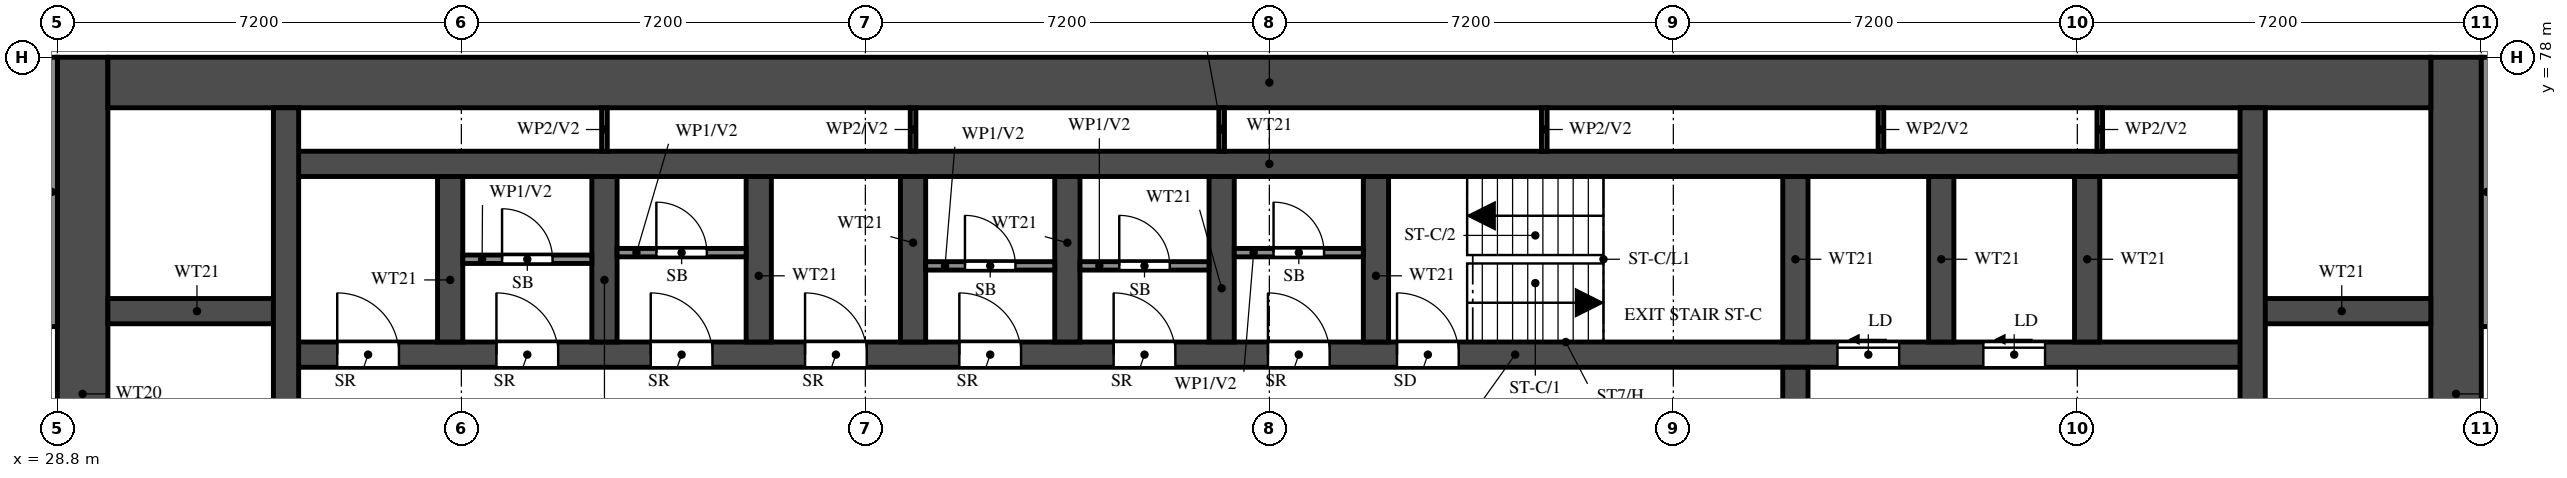
"""IFC4 building model, lengths in metres.
Left out: names, types, materials, properties, quantities, classifications, styles, units other than length and angle.
Written with IfcOpenShell. Run it as: python <this file> out.ifc"""

import sys

from ifc_helpers import new_model, si_unit, direction, frame, frame_2d, origin, place, context, subcontext, project, spatial, rectangle, extrude, element, fill, save


model = new_model("IFC4")
c1 = context("Model", 3, precision=1e-05, world=origin(), true_north=direction((0.0, 1.0)))
c2 = subcontext(c1, "Body", "Model", "MODEL_VIEW")
j1 = project(units=[si_unit("LENGTHUNIT", "METRE"), si_unit("PLANEANGLEUNIT", "RADIAN")], contexts=[c1])
p1 = place(None, origin())
s1 = spatial("IfcSite", under=j1, at=p1, CompositionType="ELEMENT")
p2 = place(p1, origin())
s2 = spatial("IfcBuilding", under=s1, at=p2, CompositionType="ELEMENT")
p3 = place(p2, frame((0.0, 0.0, 90.0)))
s3 = spatial("IfcBuildingStorey", under=s2, at=p3, CompositionType="ELEMENT", Elevation=90.0)
for number, where, z_axis, x_axis in (
    (1, (29.25, 66.0, 0.0), (0.0, 0.0, 1.0), (0.0, 1.0, 0.0)),
    (2, (71.55, 66.0, 0.0), (0.0, 0.0, 1.0), (0.0, 1.0, 0.0)),
):
    element("IfcWall", number, at=place(p3, frame(where, z_axis=z_axis, x_axis=x_axis)), inside=s3, PredefinedType="SHEAR", context=c2, shape_type="SweptSolid", body=[
        extrude(rectangle(XDim=12.0, YDim=0.9, at=frame_2d((6.0, 0.0))), origin(), (0.0, 0.0, 1.0), 3.18),
    ])
p4 = place(p3, frame((29.7, 77.55, 0.0), z_axis=(0.0, 0.0, 1.0), x_axis=(1.0, 0.0, 0.0)))
e3 = element("IfcWall", 3, at=p4, inside=s3, PredefinedType="SHEAR", context=c2, shape_type="SweptSolid", body=[
    extrude(rectangle(XDim=41.4, YDim=0.9, at=frame_2d((20.7, 0.0))), origin(), (0.0, 0.0, 1.0), 3.18),
])
p5 = place(p3, frame((32.875, 72.7, 0.0), z_axis=(0.0, 0.0, 1.0), x_axis=(1.0, 0.0, 0.0)))
e4 = element("IfcWall", 4, at=p5, inside=s3, PredefinedType="SHEAR", context=c2, shape_type="SweptSolid", body=[
    extrude(rectangle(XDim=35.05, YDim=0.45, at=frame_2d((17.525, 0.0))), origin(), (0.0, 0.0, 1.0), 3.18),
])
p6 = place(p5, frame((19.8, 0.0, 0.0)))
e5 = element("IfcOpeningElement", 5, at=p6, cuts=e4, PredefinedType="OPENING", context=c2, shape_type="SweptSolid", body=[
    extrude(rectangle(XDim=1.1, YDim=2.1, at=frame_2d((0.55, 1.05))), frame((0.0, 0.235, 0.0), z_axis=(0.0, -1.0, 0.0), x_axis=(1.0, 0.0, 0.0)), (0.0, 0.0, 1.0), 0.47),
])
p7 = place(p5, frame((27.65, 0.0, 0.0)))
e6 = element("IfcOpeningElement", 6, at=p7, cuts=e4, PredefinedType="OPENING", context=c2, shape_type="SweptSolid", body=[
    extrude(rectangle(XDim=1.1, YDim=2.1, at=frame_2d((0.55, 1.05))), frame((0.0, 0.235, 0.0), z_axis=(0.0, -1.0, 0.0), x_axis=(1.0, 0.0, 0.0)), (0.0, 0.0, 1.0), 0.47),
])
p8 = place(p5, frame((30.25, 0.0, 0.0)))
e7 = element("IfcOpeningElement", 7, at=p8, cuts=e4, PredefinedType="OPENING", context=c2, shape_type="SweptSolid", body=[
    extrude(rectangle(XDim=1.1, YDim=2.1, at=frame_2d((0.55, 1.05))), frame((0.0, 0.235, 0.0), z_axis=(0.0, -1.0, 0.0), x_axis=(1.0, 0.0, 0.0)), (0.0, 0.0, 1.0), 0.47),
])
p9 = place(p5, frame((3.75, 0.0, 0.0)))
e8 = element("IfcOpeningElement", 8, at=p9, cuts=e4, PredefinedType="OPENING", context=c2, shape_type="SweptSolid", body=[
    extrude(rectangle(XDim=1.1, YDim=2.1, at=frame_2d((0.55, 1.05))), frame((0.0, 0.235, 0.0), z_axis=(0.0, -1.0, 0.0), x_axis=(1.0, 0.0, 0.0)), (0.0, 0.0, 1.0), 0.47),
])
p10 = place(p5, frame((6.5, 0.0, 0.0)))
e9 = element("IfcOpeningElement", 9, at=p10, cuts=e4, PredefinedType="OPENING", context=c2, shape_type="SweptSolid", body=[
    extrude(rectangle(XDim=1.1, YDim=2.1, at=frame_2d((0.55, 1.05))), frame((0.0, 0.235, 0.0), z_axis=(0.0, -1.0, 0.0), x_axis=(1.0, 0.0, 0.0)), (0.0, 0.0, 1.0), 0.47),
])
p11 = place(p5, frame((9.25, 0.0, 0.0)))
e10 = element("IfcOpeningElement", 10, at=p11, cuts=e4, PredefinedType="OPENING", context=c2, shape_type="SweptSolid", body=[
    extrude(rectangle(XDim=1.1, YDim=2.1, at=frame_2d((0.55, 1.05))), frame((0.0, 0.235, 0.0), z_axis=(0.0, -1.0, 0.0), x_axis=(1.0, 0.0, 0.0)), (0.0, 0.0, 1.0), 0.47),
])
p12 = place(p5, frame((12.0, 0.0, 0.0)))
e11 = element("IfcOpeningElement", 11, at=p12, cuts=e4, PredefinedType="OPENING", context=c2, shape_type="SweptSolid", body=[
    extrude(rectangle(XDim=1.1, YDim=2.1, at=frame_2d((0.55, 1.05))), frame((0.0, 0.235, 0.0), z_axis=(0.0, -1.0, 0.0), x_axis=(1.0, 0.0, 0.0)), (0.0, 0.0, 1.0), 0.47),
])
p13 = place(p5, frame((14.75, 0.0, 0.0)))
e12 = element("IfcOpeningElement", 12, at=p13, cuts=e4, PredefinedType="OPENING", context=c2, shape_type="SweptSolid", body=[
    extrude(rectangle(XDim=1.1, YDim=2.1, at=frame_2d((0.55, 1.05))), frame((0.0, 0.235, 0.0), z_axis=(0.0, -1.0, 0.0), x_axis=(1.0, 0.0, 0.0)), (0.0, 0.0, 1.0), 0.47),
])
p14 = place(p5, frame((17.5, 0.0, 0.0)))
e13 = element("IfcOpeningElement", 13, at=p14, cuts=e4, PredefinedType="OPENING", context=c2, shape_type="SweptSolid", body=[
    extrude(rectangle(XDim=1.1, YDim=2.1, at=frame_2d((0.55, 1.05))), frame((0.0, 0.235, 0.0), z_axis=(0.0, -1.0, 0.0), x_axis=(1.0, 0.0, 0.0)), (0.0, 0.0, 1.0), 0.47),
])
p15 = place(p5, frame((0.913, 0.0, 0.0)))
e14 = element("IfcOpeningElement", 14, at=p15, cuts=e4, PredefinedType="OPENING", context=c2, shape_type="SweptSolid", body=[
    extrude(rectangle(XDim=1.1, YDim=2.1, at=frame_2d((0.55, 1.05))), frame((0.0, 0.235, 0.0), z_axis=(0.0, -1.0, 0.0), x_axis=(1.0, 0.0, 0.0)), (0.0, 0.0, 1.0), 0.47),
])
p16 = place(p3, frame((32.875, 76.1, 0.0), z_axis=(0.0, 0.0, 1.0), x_axis=(1.0, 0.0, 0.0)))
e15 = element("IfcWall", 15, at=p16, inside=s3, PredefinedType="SHEAR", context=c2, shape_type="SweptSolid", body=[
    extrude(rectangle(XDim=35.05, YDim=0.45, at=frame_2d((17.525, 0.0))), origin(), (0.0, 0.0, 1.0), 3.18),
])
for number, where, z_axis, x_axis in (
    (16, (29.7, 73.475, 0.0), (0.0, 0.0, 1.0), (1.0, 0.0, 0.0)),
    (17, (67.925, 73.475, 0.0), (0.0, 0.0, 1.0), (1.0, 0.0, 0.0)),
):
    element("IfcWall", number, at=place(p3, frame(where, z_axis=z_axis, x_axis=x_axis)), inside=s3, PredefinedType="SHEAR", context=c2, shape_type="SweptSolid", body=[
        extrude(rectangle(XDim=3.175, YDim=0.45, at=frame_2d((1.587, 0.0))), origin(), (0.0, 0.0, 1.0), 3.18),
    ])
p17 = place(p3, frame((32.875, 66.45, 0.0), z_axis=(0.0, 0.0, 1.0), x_axis=(0.0, 1.0, 0.0)))
e18 = element("IfcWall", 18, at=p17, inside=s3, PredefinedType="SHEAR", context=c2, shape_type="SweptSolid", body=[
    extrude(rectangle(XDim=10.65, YDim=0.45, at=frame_2d((5.325, 0.0))), origin(), (0.0, 0.0, 1.0), 3.18),
])
p18 = place(p3, frame((67.925, 66.45, 0.0), z_axis=(0.0, 0.0, 1.0), x_axis=(0.0, 1.0, 0.0)))
e19 = element("IfcWall", 19, at=p18, inside=s3, PredefinedType="SHEAR", context=c2, shape_type="SweptSolid", body=[
    extrude(rectangle(XDim=10.65, YDim=0.45, at=frame_2d((5.325, 0.0))), origin(), (0.0, 0.0, 1.0), 3.18),
])
p19 = place(p18, frame((0.15, 0.0, 0.0)))
e20 = element("IfcOpeningElement", 20, at=p19, cuts=e19, PredefinedType="OPENING", context=c2, shape_type="SweptSolid", body=[
    extrude(rectangle(XDim=1.1, YDim=2.1, at=frame_2d((0.55, 1.05))), frame((0.0, 0.235, 0.0), z_axis=(0.0, -1.0, 0.0), x_axis=(1.0, 0.0, 0.0)), (0.0, 0.0, 1.0), 0.47),
])
p20 = place(p3, frame((59.775, 66.45, 0.0), z_axis=(0.0, 0.0, 1.0), x_axis=(0.0, 1.0, 0.0)))
e21 = element("IfcWall", 21, at=p20, inside=s3, PredefinedType="SHEAR", context=c2, shape_type="SweptSolid", body=[
    extrude(rectangle(XDim=6.025, YDim=0.45, at=frame_2d((3.013, 0.0))), origin(), (0.0, 0.0, 1.0), 3.18),
])
p21 = place(p20, frame((3.85, 0.0, 0.0)))
e22 = element("IfcOpeningElement", 22, at=p21, cuts=e21, PredefinedType="OPENING", context=c2, shape_type="SweptSolid", body=[
    extrude(rectangle(XDim=1.2, YDim=2.1, at=frame_2d((0.6, 1.05))), frame((0.0, 0.235, 0.0), z_axis=(0.0, -1.0, 0.0), x_axis=(1.0, 0.0, 0.0)), (0.0, 0.0, 1.0), 0.47),
])
for number, where, z_axis, x_axis in (
    (23, (59.775, 72.925, 0.0), (0.0, 0.0, 1.0), (0.0, 1.0, 0.0)),
    (24, (35.8, 72.925, 0.0), (0.0, 0.0, 1.0), (0.0, 1.0, 0.0)),
    (25, (38.55, 72.925, 0.0), (0.0, 0.0, 1.0), (0.0, 1.0, 0.0)),
    (26, (41.3, 72.925, 0.0), (0.0, 0.0, 1.0), (0.0, 1.0, 0.0)),
    (27, (44.05, 72.925, 0.0), (0.0, 0.0, 1.0), (0.0, 1.0, 0.0)),
    (28, (46.8, 72.925, 0.0), (0.0, 0.0, 1.0), (0.0, 1.0, 0.0)),
    (29, (49.55, 72.925, 0.0), (0.0, 0.0, 1.0), (0.0, 1.0, 0.0)),
    (30, (52.3, 72.925, 0.0), (0.0, 0.0, 1.0), (0.0, 1.0, 0.0)),
    (31, (62.375, 72.925, 0.0), (0.0, 0.0, 1.0), (0.0, 1.0, 0.0)),
    (32, (64.975, 72.925, 0.0), (0.0, 0.0, 1.0), (0.0, 1.0, 0.0)),
):
    element("IfcWall", number, at=place(p3, frame(where, z_axis=z_axis, x_axis=x_axis)), inside=s3, PredefinedType="SHEAR", context=c2, shape_type="SweptSolid", body=[
        extrude(rectangle(XDim=2.95, YDim=0.45, at=frame_2d((1.475, 0.0))), origin(), (0.0, 0.0, 1.0), 3.18),
    ])
p22 = place(p3, frame((36.025, 74.4, 0.0), z_axis=(0.0, 0.0, 1.0), x_axis=(1.0, 0.0, 0.0)))
e33 = element("IfcWall", 33, at=p22, inside=s3, PredefinedType="PARTITIONING", context=c2, shape_type="SweptSolid", body=[
    extrude(rectangle(XDim=2.3, YDim=0.15, at=frame_2d((1.15, 0.0))), origin(), (0.0, 0.0, 1.0), 3.18),
])
p23 = place(p22, frame((0.7, 0.0, 0.0)))
e34 = element("IfcOpeningElement", 34, at=p23, cuts=e33, PredefinedType="OPENING", context=c2, shape_type="SweptSolid", body=[
    extrude(rectangle(XDim=0.9, YDim=2.1, at=frame_2d((0.45, 1.05))), frame((0.0, 0.085, 0.0), z_axis=(0.0, -1.0, 0.0), x_axis=(1.0, 0.0, 0.0)), (0.0, 0.0, 1.0), 0.17),
])
p24 = place(p3, frame((38.775, 74.518, 0.0), z_axis=(0.0, 0.0, 1.0), x_axis=(1.0, 0.0, 0.0)))
e35 = element("IfcWall", 35, at=p24, inside=s3, PredefinedType="PARTITIONING", context=c2, shape_type="SweptSolid", body=[
    extrude(rectangle(XDim=2.3, YDim=0.15, at=frame_2d((1.15, 0.0))), origin(), (0.0, 0.0, 1.0), 3.18),
])
p25 = place(p24, frame((0.7, 0.0, 0.0)))
e36 = element("IfcOpeningElement", 36, at=p25, cuts=e35, PredefinedType="OPENING", context=c2, shape_type="SweptSolid", body=[
    extrude(rectangle(XDim=0.9, YDim=2.1, at=frame_2d((0.45, 1.05))), frame((0.0, 0.085, 0.0), z_axis=(0.0, -1.0, 0.0), x_axis=(1.0, 0.0, 0.0)), (0.0, 0.0, 1.0), 0.17),
])
p26 = place(p3, frame((44.275, 74.282, 0.0), z_axis=(0.0, 0.0, 1.0), x_axis=(1.0, 0.0, 0.0)))
e37 = element("IfcWall", 37, at=p26, inside=s3, PredefinedType="PARTITIONING", context=c2, shape_type="SweptSolid", body=[
    extrude(rectangle(XDim=2.3, YDim=0.15, at=frame_2d((1.15, 0.0))), origin(), (0.0, 0.0, 1.0), 3.18),
])
p27 = place(p26, frame((0.7, 0.0, 0.0)))
e38 = element("IfcOpeningElement", 38, at=p27, cuts=e37, PredefinedType="OPENING", context=c2, shape_type="SweptSolid", body=[
    extrude(rectangle(XDim=0.9, YDim=2.1, at=frame_2d((0.45, 1.05))), frame((0.0, 0.085, 0.0), z_axis=(0.0, -1.0, 0.0), x_axis=(1.0, 0.0, 0.0)), (0.0, 0.0, 1.0), 0.17),
])
p28 = place(p3, frame((47.025, 74.282, 0.0), z_axis=(0.0, 0.0, 1.0), x_axis=(1.0, 0.0, 0.0)))
e39 = element("IfcWall", 39, at=p28, inside=s3, PredefinedType="PARTITIONING", context=c2, shape_type="SweptSolid", body=[
    extrude(rectangle(XDim=2.3, YDim=0.15, at=frame_2d((1.15, 0.0))), origin(), (0.0, 0.0, 1.0), 3.18),
])
p29 = place(p28, frame((0.7, 0.0, 0.0)))
e40 = element("IfcOpeningElement", 40, at=p29, cuts=e39, PredefinedType="OPENING", context=c2, shape_type="SweptSolid", body=[
    extrude(rectangle(XDim=0.9, YDim=2.1, at=frame_2d((0.45, 1.05))), frame((0.0, 0.085, 0.0), z_axis=(0.0, -1.0, 0.0), x_axis=(1.0, 0.0, 0.0)), (0.0, 0.0, 1.0), 0.17),
])
p30 = place(p3, frame((49.775, 74.518, 0.0), z_axis=(0.0, 0.0, 1.0), x_axis=(1.0, 0.0, 0.0)))
e41 = element("IfcWall", 41, at=p30, inside=s3, PredefinedType="PARTITIONING", context=c2, shape_type="SweptSolid", body=[
    extrude(rectangle(XDim=2.3, YDim=0.15, at=frame_2d((1.15, 0.0))), origin(), (0.0, 0.0, 1.0), 3.18),
])
p31 = place(p30, frame((0.7, 0.0, 0.0)))
e42 = element("IfcOpeningElement", 42, at=p31, cuts=e41, PredefinedType="OPENING", context=c2, shape_type="SweptSolid", body=[
    extrude(rectangle(XDim=0.9, YDim=2.1, at=frame_2d((0.45, 1.05))), frame((0.0, 0.085, 0.0), z_axis=(0.0, -1.0, 0.0), x_axis=(1.0, 0.0, 0.0)), (0.0, 0.0, 1.0), 0.17),
])
for number, where, z_axis, x_axis in (
    (43, (38.55, 76.325, 0.0), (0.0, 0.0, 1.0), (0.0, 1.0, 0.0)),
    (44, (44.05, 76.325, 0.0), (0.0, 0.0, 1.0), (0.0, 1.0, 0.0)),
    (45, (49.55, 76.325, 0.0), (0.0, 0.0, 1.0), (0.0, 1.0, 0.0)),
    (46, (55.3, 76.325, 0.0), (0.0, 0.0, 1.0), (0.0, 1.0, 0.0)),
    (47, (61.3, 76.325, 0.0), (0.0, 0.0, 1.0), (0.0, 1.0, 0.0)),
    (48, (65.2, 76.325, 0.0), (0.0, 0.0, 1.0), (0.0, 1.0, 0.0)),
):
    element("IfcWall", number, at=place(p3, frame(where, z_axis=z_axis, x_axis=x_axis)), inside=s3, PredefinedType="PARTITIONING", context=c2, shape_type="SweptSolid", body=[
        extrude(rectangle(XDim=0.775, YDim=0.1, at=frame_2d((0.388, 0.0))), origin(), (0.0, 0.0, 1.0), 3.18),
    ])
for number, where, z_axis, x_axis in (
    (49, (28.7, 73.2, 0.0), (0.0, 0.0, 1.0), (0.0, 1.0, 0.0)),
    (50, (72.1, 73.2, 0.0), (0.0, 0.0, 1.0), (0.0, 1.0, 0.0)),
):
    element("IfcWall", number, at=place(p3, frame(where, z_axis=z_axis, x_axis=x_axis)), inside=s3, PredefinedType="SOLIDWALL", context=c2, shape_type="SweptSolid", body=[
        extrude(rectangle(XDim=4.8, YDim=0.2, at=frame_2d((2.4, 0.0))), origin(), (0.0, 0.0, 1.0), 3.18),
    ])
p32 = place(p6, origin())
e51 = element("IfcDoor", 51, at=p32, inside=s3, OperationType="SINGLE_SWING_LEFT", PredefinedType="DOOR", context=c2, shape_type="SweptSolid", body=[
    extrude(rectangle(XDim=1.1, YDim=2.1, at=frame_2d((0.55, 1.05))), frame((0.0, 0.025, 0.0), z_axis=(0.0, -1.0, 0.0), x_axis=(1.0, 0.0, 0.0)), (0.0, 0.0, 1.0), 0.05),
])
fill(e5, e51)
p33 = place(p7, origin())
e52 = element("IfcDoor", 52, at=p33, inside=s3, OperationType="SLIDING_TO_LEFT", PredefinedType="DOOR", context=c2, shape_type="SweptSolid", body=[
    extrude(rectangle(XDim=1.1, YDim=2.1, at=frame_2d((0.55, 1.05))), frame((0.0, 0.025, 0.0), z_axis=(0.0, -1.0, 0.0), x_axis=(1.0, 0.0, 0.0)), (0.0, 0.0, 1.0), 0.05),
])
fill(e6, e52)
p34 = place(p8, origin())
e53 = element("IfcDoor", 53, at=p34, inside=s3, OperationType="SLIDING_TO_LEFT", PredefinedType="DOOR", context=c2, shape_type="SweptSolid", body=[
    extrude(rectangle(XDim=1.1, YDim=2.1, at=frame_2d((0.55, 1.05))), frame((0.0, 0.025, 0.0), z_axis=(0.0, -1.0, 0.0), x_axis=(1.0, 0.0, 0.0)), (0.0, 0.0, 1.0), 0.05),
])
fill(e7, e53)
p35 = place(p9, origin())
e54 = element("IfcDoor", 54, at=p35, inside=s3, OperationType="SINGLE_SWING_LEFT", PredefinedType="DOOR", context=c2, shape_type="SweptSolid", body=[
    extrude(rectangle(XDim=1.1, YDim=2.1, at=frame_2d((0.55, 1.05))), frame((0.0, 0.025, 0.0), z_axis=(0.0, -1.0, 0.0), x_axis=(1.0, 0.0, 0.0)), (0.0, 0.0, 1.0), 0.05),
])
fill(e8, e54)
p36 = place(p23, origin())
e55 = element("IfcDoor", 55, at=p36, inside=s3, OperationType="SINGLE_SWING_LEFT", PredefinedType="DOOR", context=c2, shape_type="SweptSolid", body=[
    extrude(rectangle(XDim=0.9, YDim=2.1, at=frame_2d((0.45, 1.05))), frame((0.0, 0.025, 0.0), z_axis=(0.0, -1.0, 0.0), x_axis=(1.0, 0.0, 0.0)), (0.0, 0.0, 1.0), 0.05),
])
fill(e34, e55)
p37 = place(p10, origin())
e56 = element("IfcDoor", 56, at=p37, inside=s3, OperationType="SINGLE_SWING_LEFT", PredefinedType="DOOR", context=c2, shape_type="SweptSolid", body=[
    extrude(rectangle(XDim=1.1, YDim=2.1, at=frame_2d((0.55, 1.05))), frame((0.0, 0.025, 0.0), z_axis=(0.0, -1.0, 0.0), x_axis=(1.0, 0.0, 0.0)), (0.0, 0.0, 1.0), 0.05),
])
fill(e9, e56)
p38 = place(p25, origin())
e57 = element("IfcDoor", 57, at=p38, inside=s3, OperationType="SINGLE_SWING_LEFT", PredefinedType="DOOR", context=c2, shape_type="SweptSolid", body=[
    extrude(rectangle(XDim=0.9, YDim=2.1, at=frame_2d((0.45, 1.05))), frame((0.0, 0.025, 0.0), z_axis=(0.0, -1.0, 0.0), x_axis=(1.0, 0.0, 0.0)), (0.0, 0.0, 1.0), 0.05),
])
fill(e36, e57)
p39 = place(p11, origin())
e58 = element("IfcDoor", 58, at=p39, inside=s3, OperationType="SINGLE_SWING_LEFT", PredefinedType="DOOR", context=c2, shape_type="SweptSolid", body=[
    extrude(rectangle(XDim=1.1, YDim=2.1, at=frame_2d((0.55, 1.05))), frame((0.0, 0.025, 0.0), z_axis=(0.0, -1.0, 0.0), x_axis=(1.0, 0.0, 0.0)), (0.0, 0.0, 1.0), 0.05),
])
fill(e10, e58)
p40 = place(p12, origin())
e59 = element("IfcDoor", 59, at=p40, inside=s3, OperationType="SINGLE_SWING_LEFT", PredefinedType="DOOR", context=c2, shape_type="SweptSolid", body=[
    extrude(rectangle(XDim=1.1, YDim=2.1, at=frame_2d((0.55, 1.05))), frame((0.0, 0.025, 0.0), z_axis=(0.0, -1.0, 0.0), x_axis=(1.0, 0.0, 0.0)), (0.0, 0.0, 1.0), 0.05),
])
fill(e11, e59)
p41 = place(p27, origin())
e60 = element("IfcDoor", 60, at=p41, inside=s3, OperationType="SINGLE_SWING_RIGHT", PredefinedType="DOOR", context=c2, shape_type="SweptSolid", body=[
    extrude(rectangle(XDim=0.9, YDim=2.1, at=frame_2d((0.45, 1.05))), frame((0.0, 0.025, 0.0), z_axis=(0.0, -1.0, 0.0), x_axis=(1.0, 0.0, 0.0)), (0.0, 0.0, 1.0), 0.05),
])
fill(e38, e60)
p42 = place(p13, origin())
e61 = element("IfcDoor", 61, at=p42, inside=s3, OperationType="SINGLE_SWING_LEFT", PredefinedType="DOOR", context=c2, shape_type="SweptSolid", body=[
    extrude(rectangle(XDim=1.1, YDim=2.1, at=frame_2d((0.55, 1.05))), frame((0.0, 0.025, 0.0), z_axis=(0.0, -1.0, 0.0), x_axis=(1.0, 0.0, 0.0)), (0.0, 0.0, 1.0), 0.05),
])
fill(e12, e61)
p43 = place(p29, origin())
e62 = element("IfcDoor", 62, at=p43, inside=s3, OperationType="SINGLE_SWING_LEFT", PredefinedType="DOOR", context=c2, shape_type="SweptSolid", body=[
    extrude(rectangle(XDim=0.9, YDim=2.1, at=frame_2d((0.45, 1.05))), frame((0.0, 0.025, 0.0), z_axis=(0.0, -1.0, 0.0), x_axis=(1.0, 0.0, 0.0)), (0.0, 0.0, 1.0), 0.05),
])
fill(e40, e62)
p44 = place(p14, origin())
e63 = element("IfcDoor", 63, at=p44, inside=s3, OperationType="SINGLE_SWING_LEFT", PredefinedType="DOOR", context=c2, shape_type="SweptSolid", body=[
    extrude(rectangle(XDim=1.1, YDim=2.1, at=frame_2d((0.55, 1.05))), frame((0.0, 0.025, 0.0), z_axis=(0.0, -1.0, 0.0), x_axis=(1.0, 0.0, 0.0)), (0.0, 0.0, 1.0), 0.05),
])
fill(e13, e63)
p45 = place(p31, origin())
e64 = element("IfcDoor", 64, at=p45, inside=s3, OperationType="SINGLE_SWING_LEFT", PredefinedType="DOOR", context=c2, shape_type="SweptSolid", body=[
    extrude(rectangle(XDim=0.9, YDim=2.1, at=frame_2d((0.45, 1.05))), frame((0.0, 0.025, 0.0), z_axis=(0.0, -1.0, 0.0), x_axis=(1.0, 0.0, 0.0)), (0.0, 0.0, 1.0), 0.05),
])
fill(e42, e64)
p46 = place(p15, origin())
e65 = element("IfcDoor", 65, at=p46, inside=s3, OperationType="SINGLE_SWING_LEFT", PredefinedType="DOOR", context=c2, shape_type="SweptSolid", body=[
    extrude(rectangle(XDim=1.1, YDim=2.1, at=frame_2d((0.55, 1.05))), frame((0.0, 0.025, 0.0), z_axis=(0.0, -1.0, 0.0), x_axis=(1.0, 0.0, 0.0)), (0.0, 0.0, 1.0), 0.05),
])
fill(e14, e65)
save(model, sys.argv[1])
